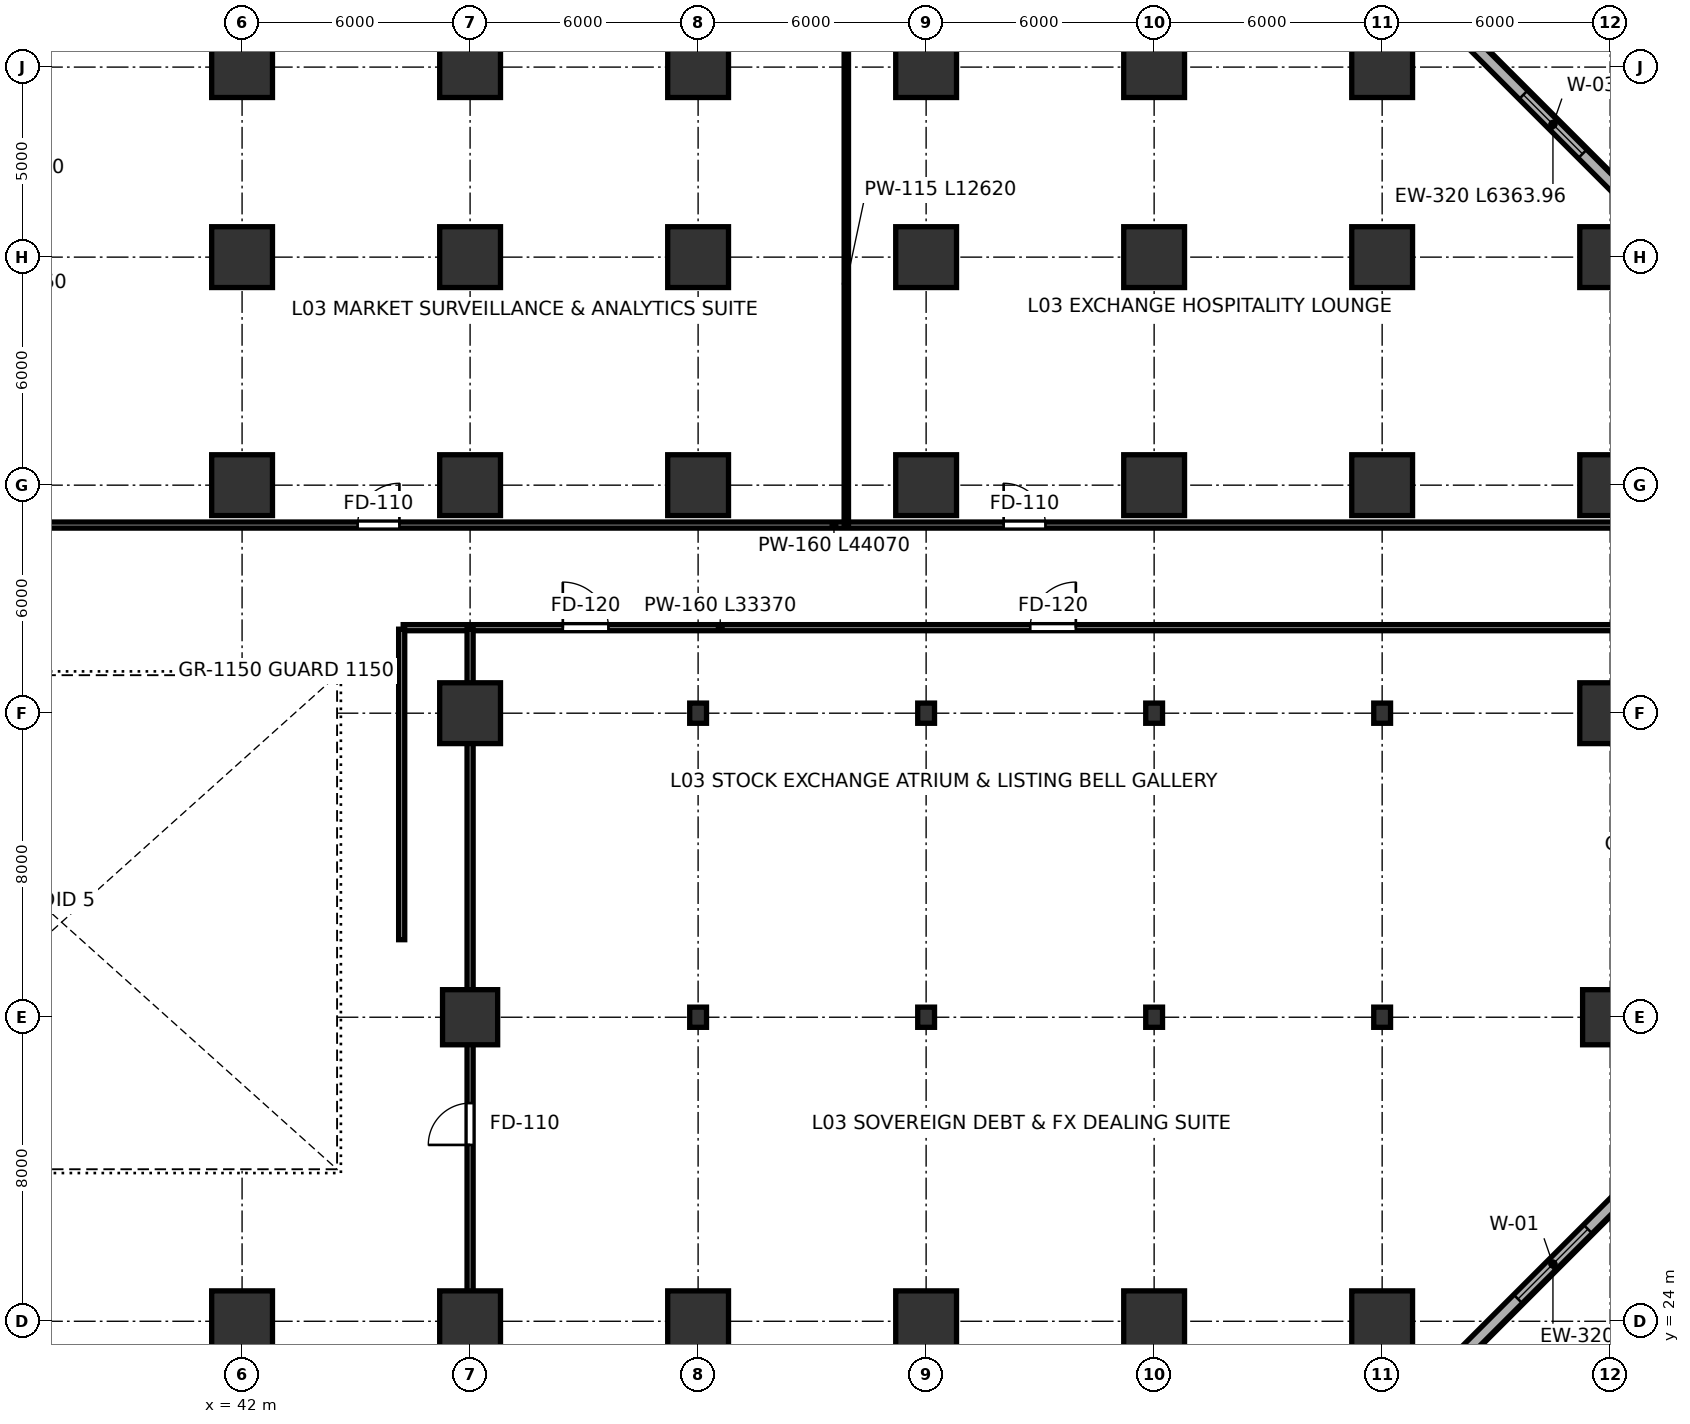
"""IFC4 building model, lengths in metres.
Left out: names, types, materials, properties, quantities, classifications, styles, units other than length and angle.
Written with IfcOpenShell. Run it as: python <this file> out.ifc"""

import sys

from ifc_helpers import new_model, si_unit, direction, frame, frame_2d, origin, origin_2d, place, context, subcontext, project, spatial, rectangle, i_section, extrude, source, transform, mapped, element, fill, save


model = new_model("IFC4")
c1 = context("Model", 3, precision=1e-05, world=origin(), true_north=direction((0.0, 1.0)))
c2 = subcontext(c1, "Body", "Model", "MODEL_VIEW")
j1 = project(units=[si_unit("LENGTHUNIT", "METRE"), si_unit("PLANEANGLEUNIT", "RADIAN")], contexts=[c1])
p1 = place(None, origin())
s1 = spatial("IfcSite", under=j1, at=p1, CompositionType="ELEMENT")
p2 = place(p1, origin())
s2 = spatial("IfcBuilding", under=s1, at=p2, CompositionType="ELEMENT")
p3 = place(p2, frame((0.0, 0.0, 12.0)))
s3 = spatial("IfcBuildingStorey", under=s2, at=p3, CompositionType="ELEMENT", Elevation=12.0)
m1 = source(origin(), c2, "Body", "SweptSolid", [
    extrude(rectangle(XDim=1.6, YDim=1.6, at=origin_2d()), origin(), (0.0, 0.0, 1.0), 5.398),
])
p4 = place(p3, frame((42.0, 24.0, 0.001), z_axis=(0.0, 0.0, 1.0), x_axis=(1.0, 0.0, 0.0)))
e1 = element("IfcColumn", 1, at=p4, inside=s3, PredefinedType="COLUMN", context=c2, shape_type="MappedRepresentation", body=[
    mapped(m1, transform((0.0, 0.0, 0.0), scale=1.0)),
])
m2 = source(origin(), c2, "Body", "SweptSolid", [
    extrude(rectangle(XDim=1.6, YDim=1.6, at=origin_2d()), origin(), (0.0, 0.0, 1.0), 5.398),
])
for number, where, z_axis, x_axis in (
    (2, (42.0, 46.0, 0.001), (0.0, 0.0, 1.0), (1.0, 0.0, 0.0)),
    (3, (42.0, 52.0, 0.001), (0.0, 0.0, 1.0), (1.0, 0.0, 0.0)),
):
    element("IfcColumn", number, at=place(p3, frame(where, z_axis=z_axis, x_axis=x_axis)), inside=s3, PredefinedType="COLUMN", context=c2, shape_type="MappedRepresentation", body=[
        mapped(m2, transform((0.0, 0.0, 0.0), scale=1.0)),
    ])
for number, where, z_axis, x_axis in (
    (4, (42.0, 57.0, 0.001), (0.0, 0.0, 1.0), (1.0, 0.0, 0.0)),
    (5, (48.0, 24.0, 0.001), (0.0, 0.0, 1.0), (1.0, 0.0, 0.0)),
):
    element("IfcColumn", number, at=place(p3, frame(where, z_axis=z_axis, x_axis=x_axis)), inside=s3, PredefinedType="COLUMN", context=c2, shape_type="MappedRepresentation", body=[
        mapped(m1, transform((0.0, 0.0, 0.0), scale=1.0)),
    ])
m3 = source(origin(), c2, "Body", "SweptSolid", [
    extrude(rectangle(XDim=1.45, YDim=1.45, at=origin_2d()), origin(), (0.0, 0.0, 1.0), 5.398),
])
p5 = place(p3, frame((48.0, 32.0, 0.001), z_axis=(0.0, 0.0, 1.0), x_axis=(1.0, 0.0, 0.0)))
e6 = element("IfcColumn", 6, at=p5, inside=s3, PredefinedType="COLUMN", context=c2, shape_type="MappedRepresentation", body=[
    mapped(m3, transform((0.0, 0.0, 0.0), scale=1.0)),
])
for number, where, z_axis, x_axis in (
    (7, (48.0, 40.0, 0.001), (0.0, 0.0, 1.0), (1.0, 0.0, 0.0)),
    (8, (48.0, 46.0, 0.001), (0.0, 0.0, 1.0), (1.0, 0.0, 0.0)),
    (9, (48.0, 52.0, 0.001), (0.0, 0.0, 1.0), (1.0, 0.0, 0.0)),
):
    element("IfcColumn", number, at=place(p3, frame(where, z_axis=z_axis, x_axis=x_axis)), inside=s3, PredefinedType="COLUMN", context=c2, shape_type="MappedRepresentation", body=[
        mapped(m2, transform((0.0, 0.0, 0.0), scale=1.0)),
    ])
for number, where, z_axis, x_axis in (
    (10, (48.0, 57.0, 0.001), (0.0, 0.0, 1.0), (1.0, 0.0, 0.0)),
    (11, (54.0, 24.0, 0.001), (0.0, 0.0, 1.0), (1.0, 0.0, 0.0)),
):
    element("IfcColumn", number, at=place(p3, frame(where, z_axis=z_axis, x_axis=x_axis)), inside=s3, PredefinedType="COLUMN", context=c2, shape_type="MappedRepresentation", body=[
        mapped(m1, transform((0.0, 0.0, 0.0), scale=1.0)),
    ])
m4 = source(origin(), c2, "Body", "SweptSolid", [
    extrude(i_section(OverallWidth=0.442, OverallDepth=0.531, WebThickness=0.066, FlangeThickness=0.106, FilletRadius=0.015, at=origin_2d()), origin(), (0.0, 0.0, 1.0), 5.398),
])
for number, where, z_axis, x_axis in (
    (12, (54.0, 32.0, 0.001), (0.0, 0.0, 1.0), (1.0, 0.0, 0.0)),
    (13, (54.0, 40.0, 0.001), (0.0, 0.0, 1.0), (1.0, 0.0, 0.0)),
):
    element("IfcColumn", number, at=place(p3, frame(where, z_axis=z_axis, x_axis=x_axis)), inside=s3, PredefinedType="COLUMN", context=c2, shape_type="MappedRepresentation", body=[
        mapped(m4, transform((0.0, 0.0, 0.0), scale=1.0)),
    ])
for number, where, z_axis, x_axis in (
    (14, (54.0, 46.0, 0.001), (0.0, 0.0, 1.0), (1.0, 0.0, 0.0)),
    (15, (54.0, 52.0, 0.001), (0.0, 0.0, 1.0), (1.0, 0.0, 0.0)),
):
    element("IfcColumn", number, at=place(p3, frame(where, z_axis=z_axis, x_axis=x_axis)), inside=s3, PredefinedType="COLUMN", context=c2, shape_type="MappedRepresentation", body=[
        mapped(m2, transform((0.0, 0.0, 0.0), scale=1.0)),
    ])
for number, where, z_axis, x_axis in (
    (16, (54.0, 57.0, 0.001), (0.0, 0.0, 1.0), (1.0, 0.0, 0.0)),
    (17, (60.0, 24.0, 0.001), (0.0, 0.0, 1.0), (1.0, 0.0, 0.0)),
):
    element("IfcColumn", number, at=place(p3, frame(where, z_axis=z_axis, x_axis=x_axis)), inside=s3, PredefinedType="COLUMN", context=c2, shape_type="MappedRepresentation", body=[
        mapped(m1, transform((0.0, 0.0, 0.0), scale=1.0)),
    ])
for number, where, z_axis, x_axis in (
    (18, (60.0, 32.0, 0.001), (0.0, 0.0, 1.0), (1.0, 0.0, 0.0)),
    (19, (60.0, 40.0, 0.001), (0.0, 0.0, 1.0), (1.0, 0.0, 0.0)),
):
    element("IfcColumn", number, at=place(p3, frame(where, z_axis=z_axis, x_axis=x_axis)), inside=s3, PredefinedType="COLUMN", context=c2, shape_type="MappedRepresentation", body=[
        mapped(m4, transform((0.0, 0.0, 0.0), scale=1.0)),
    ])
for number, where, z_axis, x_axis in (
    (20, (60.0, 46.0, 0.001), (0.0, 0.0, 1.0), (1.0, 0.0, 0.0)),
    (21, (60.0, 52.0, 0.001), (0.0, 0.0, 1.0), (1.0, 0.0, 0.0)),
):
    element("IfcColumn", number, at=place(p3, frame(where, z_axis=z_axis, x_axis=x_axis)), inside=s3, PredefinedType="COLUMN", context=c2, shape_type="MappedRepresentation", body=[
        mapped(m2, transform((0.0, 0.0, 0.0), scale=1.0)),
    ])
for number, where, z_axis, x_axis in (
    (22, (60.0, 57.0, 0.001), (0.0, 0.0, 1.0), (1.0, 0.0, 0.0)),
    (23, (66.0, 24.0, 0.001), (0.0, 0.0, 1.0), (1.0, 0.0, 0.0)),
):
    element("IfcColumn", number, at=place(p3, frame(where, z_axis=z_axis, x_axis=x_axis)), inside=s3, PredefinedType="COLUMN", context=c2, shape_type="MappedRepresentation", body=[
        mapped(m1, transform((0.0, 0.0, 0.0), scale=1.0)),
    ])
for number, where, z_axis, x_axis in (
    (24, (66.0, 32.0, 0.001), (0.0, 0.0, 1.0), (1.0, 0.0, 0.0)),
    (25, (66.0, 40.0, 0.001), (0.0, 0.0, 1.0), (1.0, 0.0, 0.0)),
):
    element("IfcColumn", number, at=place(p3, frame(where, z_axis=z_axis, x_axis=x_axis)), inside=s3, PredefinedType="COLUMN", context=c2, shape_type="MappedRepresentation", body=[
        mapped(m4, transform((0.0, 0.0, 0.0), scale=1.0)),
    ])
for number, where, z_axis, x_axis in (
    (26, (66.0, 46.0, 0.001), (0.0, 0.0, 1.0), (1.0, 0.0, 0.0)),
    (27, (66.0, 52.0, 0.001), (0.0, 0.0, 1.0), (1.0, 0.0, 0.0)),
):
    element("IfcColumn", number, at=place(p3, frame(where, z_axis=z_axis, x_axis=x_axis)), inside=s3, PredefinedType="COLUMN", context=c2, shape_type="MappedRepresentation", body=[
        mapped(m2, transform((0.0, 0.0, 0.0), scale=1.0)),
    ])
for number, where, z_axis, x_axis in (
    (28, (66.0, 57.0, 0.001), (0.0, 0.0, 1.0), (1.0, 0.0, 0.0)),
    (29, (72.0, 24.0, 0.001), (0.0, 0.0, 1.0), (1.0, 0.0, 0.0)),
):
    element("IfcColumn", number, at=place(p3, frame(where, z_axis=z_axis, x_axis=x_axis)), inside=s3, PredefinedType="COLUMN", context=c2, shape_type="MappedRepresentation", body=[
        mapped(m1, transform((0.0, 0.0, 0.0), scale=1.0)),
    ])
for number, where, z_axis, x_axis in (
    (30, (72.0, 32.0, 0.001), (0.0, 0.0, 1.0), (1.0, 0.0, 0.0)),
    (31, (72.0, 40.0, 0.001), (0.0, 0.0, 1.0), (1.0, 0.0, 0.0)),
):
    element("IfcColumn", number, at=place(p3, frame(where, z_axis=z_axis, x_axis=x_axis)), inside=s3, PredefinedType="COLUMN", context=c2, shape_type="MappedRepresentation", body=[
        mapped(m4, transform((0.0, 0.0, 0.0), scale=1.0)),
    ])
for number, where, z_axis, x_axis in (
    (32, (72.0, 46.0, 0.001), (0.0, 0.0, 1.0), (1.0, 0.0, 0.0)),
    (33, (72.0, 52.0, 0.001), (0.0, 0.0, 1.0), (1.0, 0.0, 0.0)),
):
    element("IfcColumn", number, at=place(p3, frame(where, z_axis=z_axis, x_axis=x_axis)), inside=s3, PredefinedType="COLUMN", context=c2, shape_type="MappedRepresentation", body=[
        mapped(m2, transform((0.0, 0.0, 0.0), scale=1.0)),
    ])
p6 = place(p3, frame((72.0, 57.0, 0.001), z_axis=(0.0, 0.0, 1.0), x_axis=(1.0, 0.0, 0.0)))
e34 = element("IfcColumn", 34, at=p6, inside=s3, PredefinedType="COLUMN", context=c2, shape_type="MappedRepresentation", body=[
    mapped(m1, transform((0.0, 0.0, 0.0), scale=1.0)),
])
m5 = source(origin(), c2, "Body", "SweptSolid", [
    extrude(rectangle(XDim=1.45, YDim=1.45, at=origin_2d()), origin(), (0.0, 0.0, 1.0), 5.398),
])
p7 = place(p3, frame((78.0, 32.0, 0.001), z_axis=(0.0, 0.0, 1.0), x_axis=(1.0, 0.0, 0.0)))
e35 = element("IfcColumn", 35, at=p7, inside=s3, PredefinedType="COLUMN", context=c2, shape_type="MappedRepresentation", body=[
    mapped(m5, transform((0.0, 0.0, 0.0), scale=1.0)),
])
for number, where, z_axis, x_axis in (
    (36, (78.0, 40.0, 0.001), (0.0, 0.0, 1.0), (1.0, 0.0, 0.0)),
    (37, (78.0, 46.0, 0.001), (0.0, 0.0, 1.0), (1.0, 0.0, 0.0)),
    (38, (78.0, 52.0, 0.001), (0.0, 0.0, 1.0), (1.0, 0.0, 0.0)),
):
    element("IfcColumn", number, at=place(p3, frame(where, z_axis=z_axis, x_axis=x_axis)), inside=s3, PredefinedType="COLUMN", context=c2, shape_type="MappedRepresentation", body=[
        mapped(m1, transform((0.0, 0.0, 0.0), scale=1.0)),
    ])
p8 = place(p3, frame((74.244, 23.256, 0.0), z_axis=(0.0, 0.0, 1.0), x_axis=(0.707106781187, 0.707106781187, 0.0)))
e39 = element("IfcWall", 39, at=p8, inside=s3, PredefinedType="SOLIDWALL", context=c2, shape_type="SweptSolid", body=[
    extrude(rectangle(XDim=6.364, YDim=0.32, at=frame_2d((3.182, 0.0))), origin(), (0.0, 0.0, 1.0), 5.14),
])
p9 = place(p8, frame((1.882, 0.0, 0.65)))
e40 = element("IfcOpeningElement", 40, at=p9, cuts=e39, PredefinedType="OPENING", context=c2, shape_type="SweptSolid", body=[
    extrude(rectangle(XDim=2.6, YDim=2.35, at=frame_2d((1.3, 1.175))), frame((0.0, 0.17, 0.0), z_axis=(0.0, -1.0, 0.0), x_axis=(1.0, 0.0, 0.0)), (0.0, 0.0, 1.0), 0.34),
])
p10 = place(p3, frame((78.744, 53.244, 0.0), z_axis=(0.0, 0.0, 1.0), x_axis=(-0.707106781187, 0.707106781187, 0.0)))
e41 = element("IfcWall", 41, at=p10, inside=s3, PredefinedType="SOLIDWALL", context=c2, shape_type="SweptSolid", body=[
    extrude(rectangle(XDim=6.364, YDim=0.32, at=frame_2d((3.182, 0.0))), origin(), (0.0, 0.0, 1.0), 5.14),
])
p11 = place(p10, frame((2.082, 0.0, 0.65)))
e42 = element("IfcOpeningElement", 42, at=p11, cuts=e41, PredefinedType="OPENING", context=c2, shape_type="SweptSolid", body=[
    extrude(rectangle(XDim=2.2, YDim=2.2, at=frame_2d((1.1, 1.1))), frame((0.0, 0.17, 0.0), z_axis=(0.0, -1.0, 0.0), x_axis=(1.0, 0.0, 0.0)), (0.0, 0.0, 1.0), 0.34),
])
p12 = place(p3, frame((46.24, 42.25, 0.0), z_axis=(0.0, 0.0, 1.0), x_axis=(1.0, 0.0, 0.0)))
e43 = element("IfcWall", 43, at=p12, inside=s3, PredefinedType="PARTITIONING", context=c2, shape_type="SweptSolid", body=[
    extrude(rectangle(XDim=33.37, YDim=0.16, at=frame_2d((16.685, 0.0))), origin(), (0.0, 0.0, 1.0), 4.275),
])
p13 = place(p12, frame((4.2, 0.0, 0.0)))
e44 = element("IfcOpeningElement", 44, at=p13, cuts=e43, PredefinedType="OPENING", context=c2, shape_type="SweptSolid", body=[
    extrude(rectangle(XDim=1.2, YDim=2.2, at=frame_2d((0.6, 1.1))), frame((0.0, 0.09, 0.0), z_axis=(0.0, -1.0, 0.0), x_axis=(1.0, 0.0, 0.0)), (0.0, 0.0, 1.0), 0.18),
])
p14 = place(p12, frame((16.5, 0.0, 0.0)))
e45 = element("IfcOpeningElement", 45, at=p14, cuts=e43, PredefinedType="OPENING", context=c2, shape_type="SweptSolid", body=[
    extrude(rectangle(XDim=1.2, YDim=2.2, at=frame_2d((0.6, 1.1))), frame((0.0, 0.09, 0.0), z_axis=(0.0, -1.0, 0.0), x_axis=(1.0, 0.0, 0.0)), (0.0, 0.0, 1.0), 0.18),
])
p15 = place(p3, frame((35.54, 44.95, 0.0), z_axis=(0.0, 0.0, 1.0), x_axis=(1.0, 0.0, 0.0)))
e46 = element("IfcWall", 46, at=p15, inside=s3, PredefinedType="PARTITIONING", context=c2, shape_type="SweptSolid", body=[
    extrude(rectangle(XDim=44.07, YDim=0.16, at=frame_2d((22.035, 0.0))), origin(), (0.0, 0.0, 1.0), 4.275),
])
p16 = place(p15, frame((9.5, 0.0, 0.0)))
e47 = element("IfcOpeningElement", 47, at=p16, cuts=e46, PredefinedType="OPENING", context=c2, shape_type="SweptSolid", body=[
    extrude(rectangle(XDim=1.1, YDim=2.2, at=frame_2d((0.55, 1.1))), frame((0.0, 0.09, 0.0), z_axis=(0.0, -1.0, 0.0), x_axis=(1.0, 0.0, 0.0)), (0.0, 0.0, 1.0), 0.18),
])
p17 = place(p15, frame((26.5, 0.0, 0.0)))
e48 = element("IfcOpeningElement", 48, at=p17, cuts=e46, PredefinedType="OPENING", context=c2, shape_type="SweptSolid", body=[
    extrude(rectangle(XDim=1.1, YDim=2.2, at=frame_2d((0.55, 1.1))), frame((0.0, 0.09, 0.0), z_axis=(0.0, -1.0, 0.0), x_axis=(1.0, 0.0, 0.0)), (0.0, 0.0, 1.0), 0.18),
])
p18 = place(p3, frame((46.2, 34.04, 0.0), z_axis=(0.0, 0.0, 1.0), x_axis=(0.0, 1.0, 0.0)))
e49 = element("IfcWall", 49, at=p18, inside=s3, PredefinedType="PARTITIONING", context=c2, shape_type="SweptSolid", body=[
    extrude(rectangle(XDim=8.17, YDim=0.16, at=frame_2d((4.085, 0.0))), origin(), (0.0, 0.0, 1.0), 5.14),
])
p19 = place(p3, frame((57.9, 44.99, 0.0), z_axis=(0.0, 0.0, 1.0), x_axis=(0.0, 1.0, 0.0)))
e50 = element("IfcWall", 50, at=p19, inside=s3, PredefinedType="PARTITIONING", context=c2, shape_type="SweptSolid", body=[
    extrude(rectangle(XDim=12.62, YDim=0.115, at=frame_2d((6.31, 0.0))), origin(), (0.0, 0.0, 1.0), 4.275),
])
p20 = place(p3, frame((48.0, 24.44, 0.0), z_axis=(0.0, 0.0, 1.0), x_axis=(0.0, 1.0, 0.0)))
e51 = element("IfcWall", 51, at=p20, inside=s3, PredefinedType="PARTITIONING", context=c2, shape_type="SweptSolid", body=[
    extrude(rectangle(XDim=17.77, YDim=0.16, at=frame_2d((8.885, 0.0))), origin(), (0.0, 0.0, 1.0), 4.503),
])
p21 = place(p20, frame((4.2, 0.0, 0.0)))
e52 = element("IfcOpeningElement", 52, at=p21, cuts=e51, PredefinedType="OPENING", context=c2, shape_type="SweptSolid", body=[
    extrude(rectangle(XDim=1.1, YDim=2.2, at=frame_2d((0.55, 1.1))), frame((0.0, 0.09, 0.0), z_axis=(0.0, -1.0, 0.0), x_axis=(1.0, 0.0, 0.0)), (0.0, 0.0, 1.0), 0.18),
])
m6 = source(origin(), c2, "Body", "SweptSolid", [
    extrude(rectangle(XDim=2.6, YDim=2.35, at=frame_2d((1.3, 1.175))), frame((0.0, 0.03, 0.0), z_axis=(0.0, -1.0, 0.0), x_axis=(1.0, 0.0, 0.0)), (0.0, 0.0, 1.0), 0.06),
])
p22 = place(p9, origin())
e53 = element("IfcWindow", 53, at=p22, inside=s3, PartitioningType="DOUBLE_PANEL_VERTICAL", PredefinedType="WINDOW", context=c2, shape_type="MappedRepresentation", body=[
    mapped(m6, transform((0.0, 0.0, 0.0), scale=1.0)),
])
fill(e40, e53)
m7 = source(origin(), c2, "Body", "SweptSolid", [
    extrude(rectangle(XDim=2.2, YDim=2.2, at=frame_2d((1.1, 1.1))), frame((0.0, 0.03, 0.0), z_axis=(0.0, -1.0, 0.0), x_axis=(1.0, 0.0, 0.0)), (0.0, 0.0, 1.0), 0.06),
])
p23 = place(p11, origin())
e54 = element("IfcWindow", 54, at=p23, inside=s3, PartitioningType="SINGLE_PANEL", PredefinedType="WINDOW", context=c2, shape_type="MappedRepresentation", body=[
    mapped(m7, transform((0.0, 0.0, 0.0), scale=1.0)),
])
fill(e42, e54)
m8 = source(origin(), c2, "Body", "SweptSolid", [
    extrude(rectangle(XDim=1.2, YDim=2.2, at=frame_2d((0.6, 1.1))), frame((0.0, 0.025, 0.0), z_axis=(0.0, -1.0, 0.0), x_axis=(1.0, 0.0, 0.0)), (0.0, 0.0, 1.0), 0.05),
])
p24 = place(p13, origin())
e55 = element("IfcDoor", 55, at=p24, inside=s3, OperationType="SINGLE_SWING_LEFT", PredefinedType="DOOR", context=c2, shape_type="MappedRepresentation", body=[
    mapped(m8, transform((0.0, 0.0, 0.0), scale=1.0)),
])
fill(e44, e55)
p25 = place(p14, origin())
e56 = element("IfcDoor", 56, at=p25, inside=s3, OperationType="SINGLE_SWING_RIGHT", PredefinedType="DOOR", context=c2, shape_type="MappedRepresentation", body=[
    mapped(m8, transform((0.0, 0.0, 0.0), scale=1.0)),
])
fill(e45, e56)
m9 = source(origin(), c2, "Body", "SweptSolid", [
    extrude(rectangle(XDim=1.1, YDim=2.2, at=frame_2d((0.55, 1.1))), frame((0.0, 0.025, 0.0), z_axis=(0.0, -1.0, 0.0), x_axis=(1.0, 0.0, 0.0)), (0.0, 0.0, 1.0), 0.05),
])
p26 = place(p16, origin())
e57 = element("IfcDoor", 57, at=p26, inside=s3, OperationType="SINGLE_SWING_RIGHT", PredefinedType="DOOR", context=c2, shape_type="MappedRepresentation", body=[
    mapped(m9, transform((0.0, 0.0, 0.0), scale=1.0)),
])
fill(e47, e57)
p27 = place(p17, origin())
e58 = element("IfcDoor", 58, at=p27, inside=s3, OperationType="SINGLE_SWING_LEFT", PredefinedType="DOOR", context=c2, shape_type="MappedRepresentation", body=[
    mapped(m9, transform((0.0, 0.0, 0.0), scale=1.0)),
])
fill(e48, e58)
p28 = place(p21, origin())
e59 = element("IfcDoor", 59, at=p28, inside=s3, OperationType="SINGLE_SWING_LEFT", PredefinedType="DOOR", context=c2, shape_type="MappedRepresentation", body=[
    mapped(m9, transform((0.0, 0.0, 0.0), scale=1.0)),
])
fill(e52, e59)
save(model, sys.argv[1])
